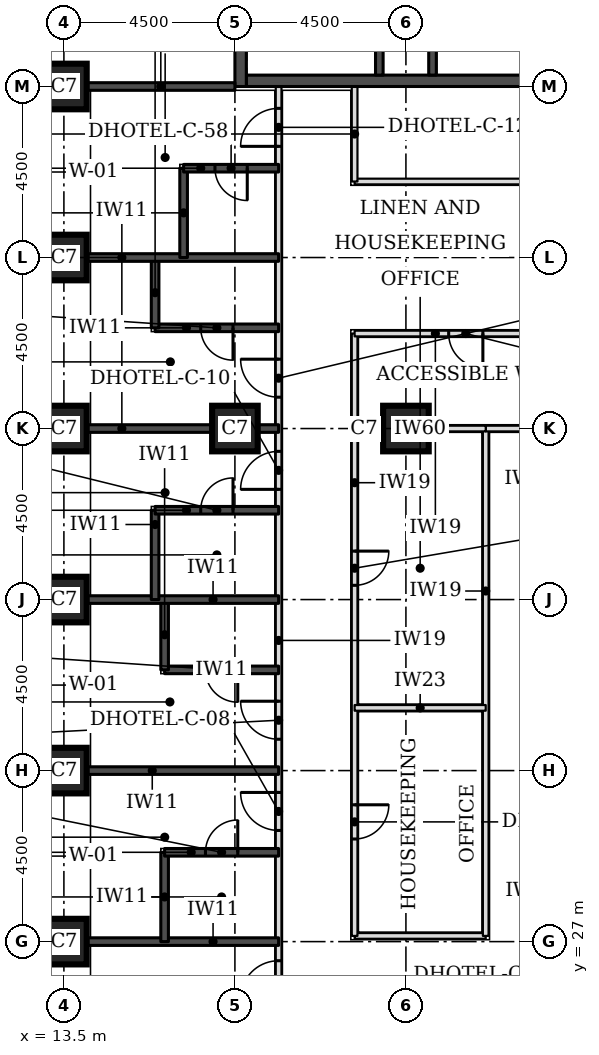
"""IFC4 building model, lengths in metres.
Left out: names, types, materials, properties, quantities, classifications, styles, units other than length and angle.
Written with IfcOpenShell. Run it as: python <this file> out.ifc"""

import sys

from ifc_helpers import new_model, si_unit, direction, frame, frame_2d, origin, origin_2d, place, context, subcontext, project, spatial, rectangle, extrude, element, fill, save


model = new_model("IFC4")
c1 = context("Model", 3, precision=1e-05, world=origin(), true_north=direction((0.0, 1.0)))
c2 = subcontext(c1, "Body", "Model", "MODEL_VIEW")
j1 = project(units=[si_unit("LENGTHUNIT", "METRE"), si_unit("PLANEANGLEUNIT", "RADIAN")], contexts=[c1])
p1 = place(None, origin())
s1 = spatial("IfcSite", under=j1, at=p1, CompositionType="ELEMENT")
p2 = place(p1, origin())
s2 = spatial("IfcBuilding", under=s1, at=p2, CompositionType="ELEMENT")
p3 = place(p2, frame((0.0, 0.0, 56.1)))
s3 = spatial("IfcBuildingStorey", under=s2, at=p3, CompositionType="ELEMENT", Elevation=56.1)
for number, where, z_axis, x_axis in (
    (1, (13.5, 27.0, 0.0), (0.0, 0.0, 1.0), (1.0, 0.0, 0.0)),
    (2, (13.5, 31.5, 0.0), (0.0, 0.0, 1.0), (1.0, 0.0, 0.0)),
    (3, (13.5, 36.0, 0.0), (0.0, 0.0, 1.0), (1.0, 0.0, 0.0)),
    (4, (13.5, 40.5, 0.0), (0.0, 0.0, 1.0), (1.0, 0.0, 0.0)),
    (5, (18.0, 40.5, 0.0), (0.0, 0.0, 1.0), (1.0, 0.0, 0.0)),
    (6, (22.5, 40.5, 0.0), (0.0, 0.0, 1.0), (1.0, 0.0, 0.0)),
    (7, (13.5, 45.0, 0.0), (0.0, 0.0, 1.0), (1.0, 0.0, 0.0)),
    (8, (13.5, 49.5, 0.0), (0.0, 0.0, 1.0), (1.0, 0.0, 0.0)),
):
    element("IfcColumn", number, at=place(p3, frame(where, z_axis=z_axis, x_axis=x_axis)), inside=s3, PredefinedType="COLUMN", context=c2, shape_type="SweptSolid", body=[
        extrude(rectangle(XDim=1.2, YDim=1.2, at=origin_2d()), origin(), (0.0, 0.0, 1.0), 3.3),
    ])
p4 = place(p3, frame((18.3, 49.65, 0.0), z_axis=(0.0, 0.0, 1.0), x_axis=(1.0, 0.0, 0.0)))
e9 = element("IfcWall", 9, at=p4, inside=s3, PredefinedType="SHEAR", context=c2, shape_type="SweptSolid", body=[
    extrude(rectangle(XDim=8.4, YDim=0.3, at=frame_2d((4.2, 0.0))), origin(), (0.0, 0.0, 1.0), 3.3),
])
p5 = place(p3, frame((18.15, 49.5, 0.0), z_axis=(0.0, 0.0, 1.0), x_axis=(0.0, 1.0, 0.0)))
e10 = element("IfcWall", 10, at=p5, inside=s3, PredefinedType="SHEAR", context=c2, shape_type="SweptSolid", body=[
    extrude(rectangle(XDim=9.0, YDim=0.3, at=frame_2d((4.5, 0.0))), origin(), (0.0, 0.0, 1.0), 3.3),
])
p6 = place(p3, frame((19.15, 25.15, 0.0), z_axis=(0.0, 0.0, 1.0), x_axis=(0.0, 1.0, 0.0)))
e11 = element("IfcWall", 11, at=p6, inside=s3, PredefinedType="PARTITIONING", context=c2, shape_type="SweptSolid", body=[
    extrude(rectangle(XDim=24.35, YDim=0.15, at=frame_2d((12.175, 0.0))), origin(), (0.0, 0.0, 1.0), 3.08),
])
p7 = place(p6, frame((0.347, 0.0, 0.0)))
e12 = element("IfcOpeningElement", 12, at=p7, cuts=e11, PredefinedType="OPENING", context=c2, shape_type="SweptSolid", body=[
    extrude(rectangle(XDim=1.0, YDim=2.1, at=frame_2d((0.5, 1.05))), frame((0.0, 0.085, 0.0), z_axis=(0.0, -1.0, 0.0), x_axis=(1.0, 0.0, 0.0)), (0.0, 0.0, 1.0), 0.17),
])
p8 = place(p6, frame((4.775, 0.0, 0.0)))
e13 = element("IfcOpeningElement", 13, at=p8, cuts=e11, PredefinedType="OPENING", context=c2, shape_type="SweptSolid", body=[
    extrude(rectangle(XDim=1.0, YDim=2.1, at=frame_2d((0.5, 1.05))), frame((0.0, 0.085, 0.0), z_axis=(0.0, -1.0, 0.0), x_axis=(1.0, 0.0, 0.0)), (0.0, 0.0, 1.0), 0.17),
])
p9 = place(p6, frame((7.175, 0.0, 0.0)))
e14 = element("IfcOpeningElement", 14, at=p9, cuts=e11, PredefinedType="OPENING", context=c2, shape_type="SweptSolid", body=[
    extrude(rectangle(XDim=1.0, YDim=2.1, at=frame_2d((0.5, 1.05))), frame((0.0, 0.085, 0.0), z_axis=(0.0, -1.0, 0.0), x_axis=(1.0, 0.0, 0.0)), (0.0, 0.0, 1.0), 0.17),
])
p10 = place(p6, frame((13.75, 0.0, 0.0)))
e15 = element("IfcOpeningElement", 15, at=p10, cuts=e11, PredefinedType="OPENING", context=c2, shape_type="SweptSolid", body=[
    extrude(rectangle(XDim=1.0, YDim=2.1, at=frame_2d((0.5, 1.05))), frame((0.0, 0.085, 0.0), z_axis=(0.0, -1.0, 0.0), x_axis=(1.0, 0.0, 0.0)), (0.0, 0.0, 1.0), 0.17),
])
p11 = place(p6, frame((16.175, 0.0, 0.0)))
e16 = element("IfcOpeningElement", 16, at=p11, cuts=e11, PredefinedType="OPENING", context=c2, shape_type="SweptSolid", body=[
    extrude(rectangle(XDim=1.0, YDim=2.1, at=frame_2d((0.5, 1.05))), frame((0.0, 0.085, 0.0), z_axis=(0.0, -1.0, 0.0), x_axis=(1.0, 0.0, 0.0)), (0.0, 0.0, 1.0), 0.17),
])
p12 = place(p6, frame((22.775, 0.0, 0.0)))
e17 = element("IfcOpeningElement", 17, at=p12, cuts=e11, PredefinedType="OPENING", context=c2, shape_type="SweptSolid", body=[
    extrude(rectangle(XDim=1.0, YDim=2.1, at=frame_2d((0.5, 1.05))), frame((0.0, 0.085, 0.0), z_axis=(0.0, -1.0, 0.0), x_axis=(1.0, 0.0, 0.0)), (0.0, 0.0, 1.0), 0.17),
])
p13 = place(p3, frame((21.15, 27.15, 0.0), z_axis=(0.0, 0.0, 1.0), x_axis=(1.0, 0.0, 0.0)))
e18 = element("IfcWall", 18, at=p13, inside=s3, PredefinedType="PARTITIONING", context=c2, shape_type="SweptSolid", body=[
    extrude(rectangle(XDim=3.45, YDim=0.15, at=frame_2d((1.725, 0.0))), origin(), (0.0, 0.0, 1.0), 3.08),
])
p14 = place(p3, frame((21.15, 27.15, 0.0), z_axis=(0.0, 0.0, 1.0), x_axis=(0.0, 1.0, 0.0)))
e19 = element("IfcWall", 19, at=p14, inside=s3, PredefinedType="PARTITIONING", context=c2, shape_type="SweptSolid", body=[
    extrude(rectangle(XDim=15.85, YDim=0.15, at=frame_2d((7.925, 0.0))), origin(), (0.0, 0.0, 1.0), 3.08),
])
p15 = place(p14, frame((2.55, 0.0, 0.0)))
e20 = element("IfcOpeningElement", 20, at=p15, cuts=e19, PredefinedType="OPENING", context=c2, shape_type="SweptSolid", body=[
    extrude(rectangle(XDim=0.9, YDim=2.1, at=frame_2d((0.45, 1.05))), frame((0.0, 0.085, 0.0), z_axis=(0.0, -1.0, 0.0), x_axis=(1.0, 0.0, 0.0)), (0.0, 0.0, 1.0), 0.17),
])
p16 = place(p14, frame((9.225, 0.0, 0.0)))
e21 = element("IfcOpeningElement", 21, at=p16, cuts=e19, PredefinedType="OPENING", context=c2, shape_type="SweptSolid", body=[
    extrude(rectangle(XDim=0.9, YDim=2.1, at=frame_2d((0.45, 1.05))), frame((0.0, 0.085, 0.0), z_axis=(0.0, -1.0, 0.0), x_axis=(1.0, 0.0, 0.0)), (0.0, 0.0, 1.0), 0.17),
])
p17 = place(p3, frame((24.6, 27.15, 0.0), z_axis=(0.0, 0.0, 1.0), x_axis=(0.0, 1.0, 0.0)))
e22 = element("IfcWall", 22, at=p17, inside=s3, PredefinedType="PARTITIONING", context=c2, shape_type="SweptSolid", body=[
    extrude(rectangle(XDim=13.35, YDim=0.15, at=frame_2d((6.675, 0.0))), origin(), (0.0, 0.0, 1.0), 3.08),
])
p18 = place(p3, frame((24.6, 40.5, 0.0), z_axis=(0.0, 0.0, 1.0), x_axis=(1.0, 0.0, 0.0)))
e23 = element("IfcWall", 23, at=p18, inside=s3, PredefinedType="PARTITIONING", context=c2, shape_type="SweptSolid", body=[
    extrude(rectangle(XDim=2.35, YDim=0.15, at=frame_2d((1.175, 0.0))), origin(), (0.0, 0.0, 1.0), 2.33),
])
p19 = place(p3, frame((21.15, 43.0, 0.0), z_axis=(0.0, 0.0, 1.0), x_axis=(1.0, 0.0, 0.0)))
e24 = element("IfcWall", 24, at=p19, inside=s3, PredefinedType="PARTITIONING", context=c2, shape_type="SweptSolid", body=[
    extrude(rectangle(XDim=5.85, YDim=0.15, at=frame_2d((2.925, 0.0))), origin(), (0.0, 0.0, 1.0), 3.08),
])
p20 = place(p19, frame((2.475, 0.0, 0.0)))
e25 = element("IfcOpeningElement", 25, at=p20, cuts=e24, PredefinedType="OPENING", context=c2, shape_type="SweptSolid", body=[
    extrude(rectangle(XDim=0.9, YDim=2.1, at=frame_2d((0.45, 1.05))), frame((0.0, 0.085, 0.0), z_axis=(0.0, -1.0, 0.0), x_axis=(1.0, 0.0, 0.0)), (0.0, 0.0, 1.0), 0.17),
])
p21 = place(p3, frame((21.15, 47.0, 0.0), z_axis=(0.0, 0.0, 1.0), x_axis=(1.0, 0.0, 0.0)))
e26 = element("IfcWall", 26, at=p21, inside=s3, PredefinedType="PARTITIONING", context=c2, shape_type="SweptSolid", body=[
    extrude(rectangle(XDim=5.85, YDim=0.15, at=frame_2d((2.925, 0.0))), origin(), (0.0, 0.0, 1.0), 3.08),
])
p22 = place(p3, frame((21.15, 47.0, 0.0), z_axis=(0.0, 0.0, 1.0), x_axis=(0.0, 1.0, 0.0)))
e27 = element("IfcWall", 27, at=p22, inside=s3, PredefinedType="PARTITIONING", context=c2, shape_type="SweptSolid", body=[
    extrude(rectangle(XDim=2.5, YDim=0.15, at=frame_2d((1.25, 0.0))), origin(), (0.0, 0.0, 1.0), 3.08),
])
p23 = place(p3, frame((14.1, 27.0, 0.0), z_axis=(0.0, 0.0, 1.0), x_axis=(1.0, 0.0, 0.0)))
e28 = element("IfcWall", 28, at=p23, inside=s3, PredefinedType="SOLIDWALL", context=c2, shape_type="SweptSolid", body=[
    extrude(rectangle(XDim=5.05, YDim=0.2, at=frame_2d((2.525, 0.0))), origin(), (0.0, 0.0, 1.0), 3.08),
])
p24 = place(p3, frame((16.15, 27.0, 0.0), z_axis=(0.0, 0.0, 1.0), x_axis=(0.0, 1.0, 0.0)))
e29 = element("IfcWall", 29, at=p24, inside=s3, PredefinedType="SOLIDWALL", context=c2, shape_type="SweptSolid", body=[
    extrude(rectangle(XDim=2.35, YDim=0.2, at=frame_2d((1.175, 0.0))), origin(), (0.0, 0.0, 1.0), 3.08),
])
p25 = place(p3, frame((16.15, 29.35, 0.0), z_axis=(0.0, 0.0, 1.0), x_axis=(1.0, 0.0, 0.0)))
e30 = element("IfcWall", 30, at=p25, inside=s3, PredefinedType="SOLIDWALL", context=c2, shape_type="SweptSolid", body=[
    extrude(rectangle(XDim=3.0, YDim=0.2, at=frame_2d((1.5, 0.0))), origin(), (0.0, 0.0, 1.0), 3.08),
])
p26 = place(p25, frame((1.075, 0.0, 0.0)))
e31 = element("IfcOpeningElement", 31, at=p26, cuts=e30, PredefinedType="OPENING", context=c2, shape_type="SweptSolid", body=[
    extrude(rectangle(XDim=0.85, YDim=2.1, at=frame_2d((0.425, 1.05))), frame((0.0, 0.11, 0.0), z_axis=(0.0, -1.0, 0.0), x_axis=(1.0, 0.0, 0.0)), (0.0, 0.0, 1.0), 0.22),
])
p27 = place(p3, frame((14.1, 31.5, 0.0), z_axis=(0.0, 0.0, 1.0), x_axis=(1.0, 0.0, 0.0)))
e32 = element("IfcWall", 32, at=p27, inside=s3, PredefinedType="SOLIDWALL", context=c2, shape_type="SweptSolid", body=[
    extrude(rectangle(XDim=5.05, YDim=0.2, at=frame_2d((2.525, 0.0))), origin(), (0.0, 0.0, 1.0), 3.08),
])
p28 = place(p3, frame((16.15, 34.15, 0.0), z_axis=(0.0, 0.0, 1.0), x_axis=(1.0, 0.0, 0.0)))
e33 = element("IfcWall", 33, at=p28, inside=s3, PredefinedType="SOLIDWALL", context=c2, shape_type="SweptSolid", body=[
    extrude(rectangle(XDim=3.0, YDim=0.2, at=frame_2d((1.5, 0.0))), origin(), (0.0, 0.0, 1.0), 3.08),
])
p29 = place(p28, frame((1.075, 0.0, 0.0)))
e34 = element("IfcOpeningElement", 34, at=p29, cuts=e33, PredefinedType="OPENING", context=c2, shape_type="SweptSolid", body=[
    extrude(rectangle(XDim=0.85, YDim=2.1, at=frame_2d((0.425, 1.05))), frame((0.0, 0.11, 0.0), z_axis=(0.0, -1.0, 0.0), x_axis=(1.0, 0.0, 0.0)), (0.0, 0.0, 1.0), 0.22),
])
p30 = place(p3, frame((16.15, 34.15, 0.0), z_axis=(0.0, 0.0, 1.0), x_axis=(0.0, 1.0, 0.0)))
e35 = element("IfcWall", 35, at=p30, inside=s3, PredefinedType="SOLIDWALL", context=c2, shape_type="SweptSolid", body=[
    extrude(rectangle(XDim=1.85, YDim=0.2, at=frame_2d((0.925, 0.0))), origin(), (0.0, 0.0, 1.0), 3.08),
])
p31 = place(p3, frame((14.1, 36.0, 0.0), z_axis=(0.0, 0.0, 1.0), x_axis=(1.0, 0.0, 0.0)))
e36 = element("IfcWall", 36, at=p31, inside=s3, PredefinedType="SOLIDWALL", context=c2, shape_type="SweptSolid", body=[
    extrude(rectangle(XDim=5.05, YDim=0.2, at=frame_2d((2.525, 0.0))), origin(), (0.0, 0.0, 1.0), 3.08),
])
p32 = place(p3, frame((15.9, 36.0, 0.0), z_axis=(0.0, 0.0, 1.0), x_axis=(0.0, 1.0, 0.0)))
e37 = element("IfcWall", 37, at=p32, inside=s3, PredefinedType="SOLIDWALL", context=c2, shape_type="SweptSolid", body=[
    extrude(rectangle(XDim=2.35, YDim=0.2, at=frame_2d((1.175, 0.0))), origin(), (0.0, 0.0, 1.0), 3.08),
])
p33 = place(p3, frame((15.9, 38.35, 0.0), z_axis=(0.0, 0.0, 1.0), x_axis=(1.0, 0.0, 0.0)))
e38 = element("IfcWall", 38, at=p33, inside=s3, PredefinedType="SOLIDWALL", context=c2, shape_type="SweptSolid", body=[
    extrude(rectangle(XDim=3.25, YDim=0.2, at=frame_2d((1.625, 0.0))), origin(), (0.0, 0.0, 1.0), 3.08),
])
p34 = place(p33, frame((1.2, 0.0, 0.0)))
e39 = element("IfcOpeningElement", 39, at=p34, cuts=e38, PredefinedType="OPENING", context=c2, shape_type="SweptSolid", body=[
    extrude(rectangle(XDim=0.85, YDim=2.1, at=frame_2d((0.425, 1.05))), frame((0.0, 0.11, 0.0), z_axis=(0.0, -1.0, 0.0), x_axis=(1.0, 0.0, 0.0)), (0.0, 0.0, 1.0), 0.22),
])
p35 = place(p3, frame((14.1, 40.5, 0.0), z_axis=(0.0, 0.0, 1.0), x_axis=(1.0, 0.0, 0.0)))
e40 = element("IfcWall", 40, at=p35, inside=s3, PredefinedType="SOLIDWALL", context=c2, shape_type="SweptSolid", body=[
    extrude(rectangle(XDim=5.05, YDim=0.2, at=frame_2d((2.525, 0.0))), origin(), (0.0, 0.0, 1.0), 3.08),
])
p36 = place(p3, frame((15.9, 43.15, 0.0), z_axis=(0.0, 0.0, 1.0), x_axis=(1.0, 0.0, 0.0)))
e41 = element("IfcWall", 41, at=p36, inside=s3, PredefinedType="SOLIDWALL", context=c2, shape_type="SweptSolid", body=[
    extrude(rectangle(XDim=3.25, YDim=0.2, at=frame_2d((1.625, 0.0))), origin(), (0.0, 0.0, 1.0), 3.08),
])
p37 = place(p36, frame((1.2, 0.0, 0.0)))
e42 = element("IfcOpeningElement", 42, at=p37, cuts=e41, PredefinedType="OPENING", context=c2, shape_type="SweptSolid", body=[
    extrude(rectangle(XDim=0.85, YDim=2.1, at=frame_2d((0.425, 1.05))), frame((0.0, 0.11, 0.0), z_axis=(0.0, -1.0, 0.0), x_axis=(1.0, 0.0, 0.0)), (0.0, 0.0, 1.0), 0.22),
])
p38 = place(p3, frame((15.9, 43.15, 0.0), z_axis=(0.0, 0.0, 1.0), x_axis=(0.0, 1.0, 0.0)))
e43 = element("IfcWall", 43, at=p38, inside=s3, PredefinedType="SOLIDWALL", context=c2, shape_type="SweptSolid", body=[
    extrude(rectangle(XDim=1.85, YDim=0.2, at=frame_2d((0.925, 0.0))), origin(), (0.0, 0.0, 1.0), 3.08),
])
p39 = place(p3, frame((14.1, 45.0, 0.0), z_axis=(0.0, 0.0, 1.0), x_axis=(1.0, 0.0, 0.0)))
e44 = element("IfcWall", 44, at=p39, inside=s3, PredefinedType="SOLIDWALL", context=c2, shape_type="SweptSolid", body=[
    extrude(rectangle(XDim=5.05, YDim=0.2, at=frame_2d((2.525, 0.0))), origin(), (0.0, 0.0, 1.0), 3.08),
])
p40 = place(p3, frame((16.65, 45.0, 0.0), z_axis=(0.0, 0.0, 1.0), x_axis=(0.0, 1.0, 0.0)))
e45 = element("IfcWall", 45, at=p40, inside=s3, PredefinedType="SOLIDWALL", context=c2, shape_type="SweptSolid", body=[
    extrude(rectangle(XDim=2.35, YDim=0.2, at=frame_2d((1.175, 0.0))), origin(), (0.0, 0.0, 1.0), 3.08),
])
p41 = place(p3, frame((16.65, 47.35, 0.0), z_axis=(0.0, 0.0, 1.0), x_axis=(1.0, 0.0, 0.0)))
e46 = element("IfcWall", 46, at=p41, inside=s3, PredefinedType="SOLIDWALL", context=c2, shape_type="SweptSolid", body=[
    extrude(rectangle(XDim=2.5, YDim=0.2, at=frame_2d((1.25, 0.0))), origin(), (0.0, 0.0, 1.0), 3.08),
])
p42 = place(p41, frame((0.825, 0.0, 0.0)))
e47 = element("IfcOpeningElement", 47, at=p42, cuts=e46, PredefinedType="OPENING", context=c2, shape_type="SweptSolid", body=[
    extrude(rectangle(XDim=0.85, YDim=2.1, at=frame_2d((0.425, 1.05))), frame((0.0, 0.11, 0.0), z_axis=(0.0, -1.0, 0.0), x_axis=(1.0, 0.0, 0.0)), (0.0, 0.0, 1.0), 0.22),
])
p43 = place(p3, frame((14.1, 49.5, 0.0), z_axis=(0.0, 0.0, 1.0), x_axis=(1.0, 0.0, 0.0)))
e48 = element("IfcWall", 48, at=p43, inside=s3, PredefinedType="SOLIDWALL", context=c2, shape_type="SweptSolid", body=[
    extrude(rectangle(XDim=3.9, YDim=0.2, at=frame_2d((1.95, 0.0))), origin(), (0.0, 0.0, 1.0), 3.08),
])
p44 = place(p3, frame((21.15, 33.15, 0.0), z_axis=(0.0, 0.0, 1.0), x_axis=(1.0, 0.0, 0.0)))
e49 = element("IfcWall", 49, at=p44, inside=s3, PredefinedType="PARTITIONING", context=c2, shape_type="SweptSolid", body=[
    extrude(rectangle(XDim=3.45, YDim=0.15, at=frame_2d((1.725, 0.0))), origin(), (0.0, 0.0, 1.0), 3.08),
])
p45 = place(p3, frame((21.15, 40.5, 0.0), z_axis=(0.0, 0.0, 1.0), x_axis=(1.0, 0.0, 0.0)))
e50 = element("IfcWall", 50, at=p45, inside=s3, PredefinedType="PARTITIONING", context=c2, shape_type="SweptSolid", body=[
    extrude(rectangle(XDim=3.45, YDim=0.15, at=frame_2d((1.725, 0.0))), origin(), (0.0, 0.0, 1.0), 2.33),
])
for number, where, z_axis, x_axis in (
    (51, (21.8, 49.8, 0.0), (0.0, 0.0, 1.0), (0.0, 1.0, 0.0)),
    (52, (23.2, 49.8, 0.0), (0.0, 0.0, 1.0), (0.0, 1.0, 0.0)),
):
    element("IfcWall", number, at=place(p3, frame(where, z_axis=z_axis, x_axis=x_axis)), inside=s3, PredefinedType="SOLIDWALL", context=c2, shape_type="SweptSolid", body=[
        extrude(rectangle(XDim=6.05, YDim=0.2, at=frame_2d((3.025, 0.0))), origin(), (0.0, 0.0, 1.0), 3.08),
    ])
p46 = place(p7, origin())
e53 = element("IfcDoor", 53, at=p46, inside=s3, OperationType="SINGLE_SWING_LEFT", PredefinedType="DOOR", context=c2, shape_type="SweptSolid", body=[
    extrude(rectangle(XDim=1.0, YDim=2.1, at=frame_2d((0.5, 1.05))), frame((0.0, 0.025, 0.0), z_axis=(0.0, -1.0, 0.0), x_axis=(1.0, 0.0, 0.0)), (0.0, 0.0, 1.0), 0.05),
])
fill(e12, e53)
p47 = place(p8, origin())
e54 = element("IfcDoor", 54, at=p47, inside=s3, OperationType="SINGLE_SWING_RIGHT", PredefinedType="DOOR", context=c2, shape_type="SweptSolid", body=[
    extrude(rectangle(XDim=1.0, YDim=2.1, at=frame_2d((0.5, 1.05))), frame((0.0, 0.025, 0.0), z_axis=(0.0, -1.0, 0.0), x_axis=(1.0, 0.0, 0.0)), (0.0, 0.0, 1.0), 0.05),
])
fill(e13, e54)
p48 = place(p26, origin())
e55 = element("IfcDoor", 55, at=p48, inside=s3, OperationType="SINGLE_SWING_RIGHT", PredefinedType="DOOR", context=c2, shape_type="SweptSolid", body=[
    extrude(rectangle(XDim=0.85, YDim=2.1, at=frame_2d((0.425, 1.05))), frame((0.0, 0.025, 0.0), z_axis=(0.0, -1.0, 0.0), x_axis=(1.0, 0.0, 0.0)), (0.0, 0.0, 1.0), 0.05),
])
fill(e31, e55)
p49 = place(p9, origin())
e56 = element("IfcDoor", 56, at=p49, inside=s3, OperationType="SINGLE_SWING_RIGHT", PredefinedType="DOOR", context=c2, shape_type="SweptSolid", body=[
    extrude(rectangle(XDim=1.0, YDim=2.1, at=frame_2d((0.5, 1.05))), frame((0.0, 0.025, 0.0), z_axis=(0.0, -1.0, 0.0), x_axis=(1.0, 0.0, 0.0)), (0.0, 0.0, 1.0), 0.05),
])
fill(e14, e56)
p50 = place(p29, frame((0.85, 0.0, 0.0), z_axis=(0.0, 0.0, 1.0), x_axis=(-1.0, 0.0, 0.0)))
e57 = element("IfcDoor", 57, at=p50, inside=s3, OperationType="SINGLE_SWING_LEFT", PredefinedType="DOOR", context=c2, shape_type="SweptSolid", body=[
    extrude(rectangle(XDim=0.85, YDim=2.1, at=frame_2d((0.425, 1.05))), frame((0.0, 0.025, 0.0), z_axis=(0.0, -1.0, 0.0), x_axis=(1.0, 0.0, 0.0)), (0.0, 0.0, 1.0), 0.05),
])
fill(e34, e57)
p51 = place(p10, origin())
e58 = element("IfcDoor", 58, at=p51, inside=s3, OperationType="SINGLE_SWING_LEFT", PredefinedType="DOOR", context=c2, shape_type="SweptSolid", body=[
    extrude(rectangle(XDim=1.0, YDim=2.1, at=frame_2d((0.5, 1.05))), frame((0.0, 0.025, 0.0), z_axis=(0.0, -1.0, 0.0), x_axis=(1.0, 0.0, 0.0)), (0.0, 0.0, 1.0), 0.05),
])
fill(e15, e58)
p52 = place(p34, origin())
e59 = element("IfcDoor", 59, at=p52, inside=s3, OperationType="SINGLE_SWING_RIGHT", PredefinedType="DOOR", context=c2, shape_type="SweptSolid", body=[
    extrude(rectangle(XDim=0.85, YDim=2.1, at=frame_2d((0.425, 1.05))), frame((0.0, 0.025, 0.0), z_axis=(0.0, -1.0, 0.0), x_axis=(1.0, 0.0, 0.0)), (0.0, 0.0, 1.0), 0.05),
])
fill(e39, e59)
p53 = place(p11, origin())
e60 = element("IfcDoor", 60, at=p53, inside=s3, OperationType="SINGLE_SWING_RIGHT", PredefinedType="DOOR", context=c2, shape_type="SweptSolid", body=[
    extrude(rectangle(XDim=1.0, YDim=2.1, at=frame_2d((0.5, 1.05))), frame((0.0, 0.025, 0.0), z_axis=(0.0, -1.0, 0.0), x_axis=(1.0, 0.0, 0.0)), (0.0, 0.0, 1.0), 0.05),
])
fill(e16, e60)
p54 = place(p37, frame((0.85, 0.0, 0.0), z_axis=(0.0, 0.0, 1.0), x_axis=(-1.0, 0.0, 0.0)))
e61 = element("IfcDoor", 61, at=p54, inside=s3, OperationType="SINGLE_SWING_LEFT", PredefinedType="DOOR", context=c2, shape_type="SweptSolid", body=[
    extrude(rectangle(XDim=0.85, YDim=2.1, at=frame_2d((0.425, 1.05))), frame((0.0, 0.025, 0.0), z_axis=(0.0, -1.0, 0.0), x_axis=(1.0, 0.0, 0.0)), (0.0, 0.0, 1.0), 0.05),
])
fill(e42, e61)
p55 = place(p12, origin())
e62 = element("IfcDoor", 62, at=p55, inside=s3, OperationType="SINGLE_SWING_LEFT", PredefinedType="DOOR", context=c2, shape_type="SweptSolid", body=[
    extrude(rectangle(XDim=1.0, YDim=2.1, at=frame_2d((0.5, 1.05))), frame((0.0, 0.025, 0.0), z_axis=(0.0, -1.0, 0.0), x_axis=(1.0, 0.0, 0.0)), (0.0, 0.0, 1.0), 0.05),
])
fill(e17, e62)
p56 = place(p42, frame((0.85, 0.0, 0.0), z_axis=(0.0, 0.0, 1.0), x_axis=(-1.0, 0.0, 0.0)))
e63 = element("IfcDoor", 63, at=p56, inside=s3, OperationType="SINGLE_SWING_LEFT", PredefinedType="DOOR", context=c2, shape_type="SweptSolid", body=[
    extrude(rectangle(XDim=0.85, YDim=2.1, at=frame_2d((0.425, 1.05))), frame((0.0, 0.025, 0.0), z_axis=(0.0, -1.0, 0.0), x_axis=(1.0, 0.0, 0.0)), (0.0, 0.0, 1.0), 0.05),
])
fill(e47, e63)
p57 = place(p15, frame((0.9, 0.0, 0.0), z_axis=(0.0, 0.0, 1.0), x_axis=(-1.0, 0.0, 0.0)))
e64 = element("IfcDoor", 64, at=p57, inside=s3, OperationType="SINGLE_SWING_LEFT", PredefinedType="DOOR", context=c2, shape_type="SweptSolid", body=[
    extrude(rectangle(XDim=0.9, YDim=2.1, at=frame_2d((0.45, 1.05))), frame((0.0, 0.025, 0.0), z_axis=(0.0, -1.0, 0.0), x_axis=(1.0, 0.0, 0.0)), (0.0, 0.0, 1.0), 0.05),
])
fill(e20, e64)
p58 = place(p16, frame((0.9, 0.0, 0.0), z_axis=(0.0, 0.0, 1.0), x_axis=(-1.0, 0.0, 0.0)))
e65 = element("IfcDoor", 65, at=p58, inside=s3, OperationType="SINGLE_SWING_LEFT", PredefinedType="DOOR", context=c2, shape_type="SweptSolid", body=[
    extrude(rectangle(XDim=0.9, YDim=2.1, at=frame_2d((0.45, 1.05))), frame((0.0, 0.025, 0.0), z_axis=(0.0, -1.0, 0.0), x_axis=(1.0, 0.0, 0.0)), (0.0, 0.0, 1.0), 0.05),
])
fill(e21, e65)
p59 = place(p20, frame((0.9, 0.0, 0.0), z_axis=(0.0, 0.0, 1.0), x_axis=(-1.0, 0.0, 0.0)))
e66 = element("IfcDoor", 66, at=p59, inside=s3, OperationType="SINGLE_SWING_LEFT", PredefinedType="DOOR", context=c2, shape_type="SweptSolid", body=[
    extrude(rectangle(XDim=0.9, YDim=2.1, at=frame_2d((0.45, 1.05))), frame((0.0, 0.025, 0.0), z_axis=(0.0, -1.0, 0.0), x_axis=(1.0, 0.0, 0.0)), (0.0, 0.0, 1.0), 0.05),
])
fill(e25, e66)
save(model, sys.argv[1])
